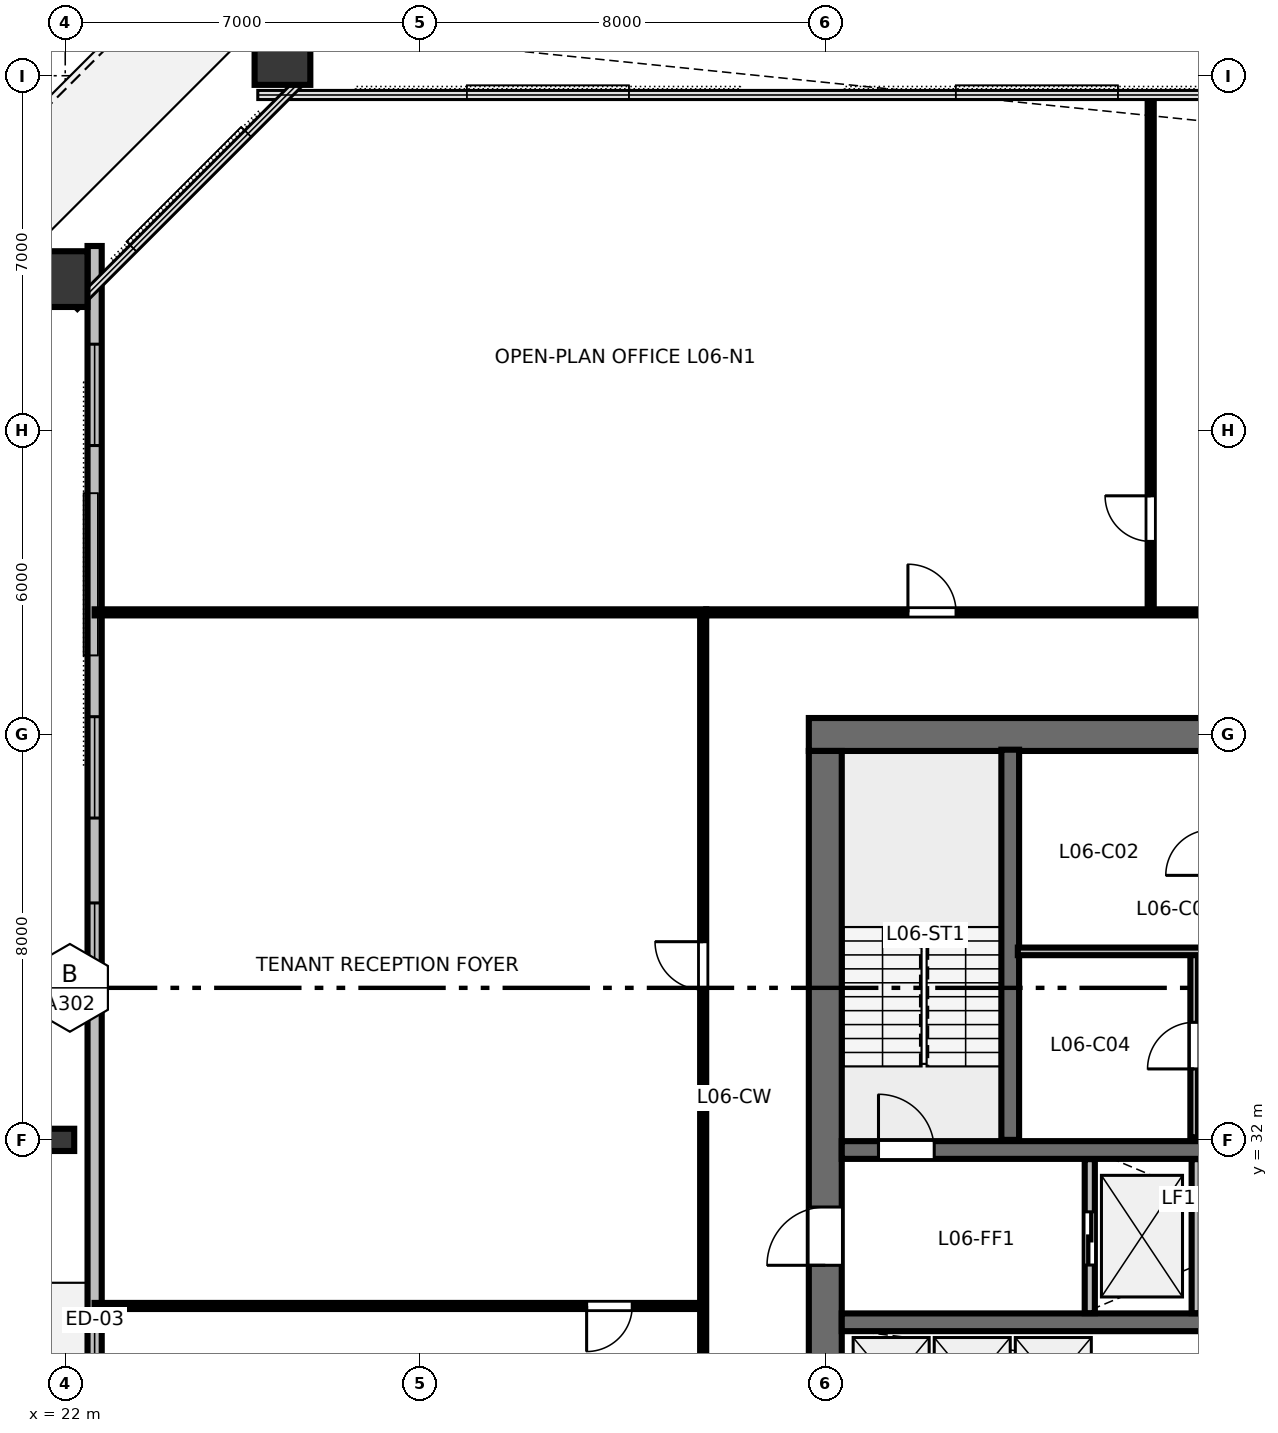
"""IFC4 building model, lengths in metres.
Left out: names, types, materials, properties, quantities, classifications, styles, units other than length and angle.
Written with IfcOpenShell. Run it as: python <this file> out.ifc"""

import sys

from ifc_helpers import new_model, si_unit, direction, frame, frame_2d, origin, origin_2d, place, context, subcontext, project, spatial, rectangle, hollow_rectangle, i_section, extrude, element, fill, save


model = new_model("IFC4")
c1 = context("Model", 3, precision=1e-05, world=origin(), true_north=direction((0.0, 1.0)))
c2 = subcontext(c1, "Body", "Model", "MODEL_VIEW")
j1 = project(units=[si_unit("LENGTHUNIT", "METRE"), si_unit("PLANEANGLEUNIT", "RADIAN")], contexts=[c1])
p1 = place(None, origin())
s1 = spatial("IfcSite", under=j1, at=p1, CompositionType="ELEMENT")
p2 = place(p1, origin())
s2 = spatial("IfcBuilding", under=s1, at=p2, CompositionType="ELEMENT")
p3 = place(p2, frame((0.0, 0.0, 28.0)))
s3 = spatial("IfcBuildingStorey", under=s2, at=p3, CompositionType="ELEMENT", Elevation=28.0)
p4 = place(p3, frame((36.675, 40.0, 0.0), z_axis=(0.0, 0.0, 1.0), x_axis=(1.0, 0.0, 0.0)))
e1 = element("IfcWall", 1, at=p4, inside=s3, PredefinedType="SHEAR", context=c2, shape_type="SweptSolid", body=[
    extrude(rectangle(XDim=18.65, YDim=0.65, at=frame_2d((9.325, 0.0))), origin(), (0.0, 0.0, 1.0), 3.36),
])
p5 = place(p4, frame((8.825, 0.0, 0.0)))
e2 = element("IfcOpeningElement", 2, at=p5, cuts=e1, PredefinedType="OPENING", context=c2, shape_type="SweptSolid", body=[
    extrude(rectangle(XDim=1.0, YDim=2.15, at=frame_2d((0.5, 1.075))), frame((0.0, 0.335, 0.0), z_axis=(0.0, -1.0, 0.0), x_axis=(1.0, 0.0, 0.0)), (0.0, 0.0, 1.0), 0.67),
])
p6 = place(p3, frame((37.0, 24.325, 0.0), z_axis=(0.0, 0.0, 1.0), x_axis=(0.0, 1.0, 0.0)))
e3 = element("IfcWall", 3, at=p6, inside=s3, PredefinedType="SHEAR", context=c2, shape_type="SweptSolid", body=[
    extrude(rectangle(XDim=15.35, YDim=0.65, at=frame_2d((7.675, 0.0))), origin(), (0.0, 0.0, 1.0), 3.36),
])
p7 = place(p6, frame((5.2, 0.0, 0.0)))
e4 = element("IfcOpeningElement", 4, at=p7, cuts=e3, PredefinedType="OPENING", context=c2, shape_type="SweptSolid", body=[
    extrude(rectangle(XDim=1.15, YDim=2.15, at=frame_2d((0.575, 1.075))), frame((0.0, 0.335, 0.0), z_axis=(0.0, -1.0, 0.0), x_axis=(1.0, 0.0, 0.0)), (0.0, 0.0, 1.0), 0.67),
])
p8 = place(p3, frame((37.325, 31.8, 0.0), z_axis=(0.0, 0.0, 1.0), x_axis=(1.0, 0.0, 0.0)))
e5 = element("IfcWall", 5, at=p8, inside=s3, PredefinedType="SHEAR", context=c2, shape_type="SweptSolid", body=[
    extrude(rectangle(XDim=17.35, YDim=0.35, at=frame_2d((8.675, 0.0))), origin(), (0.0, 0.0, 1.0), 3.36),
])
p9 = place(p8, frame((0.725, 0.0, 0.0)))
e6 = element("IfcOpeningElement", 6, at=p9, cuts=e5, PredefinedType="OPENING", context=c2, shape_type="SweptSolid", body=[
    extrude(rectangle(XDim=1.1, YDim=2.15, at=frame_2d((0.55, 1.075))), frame((0.0, 0.185, 0.0), z_axis=(0.0, -1.0, 0.0), x_axis=(1.0, 0.0, 0.0)), (0.0, 0.0, 1.0), 0.37),
])
p10 = place(p8, frame((14.625, 0.0, 0.0)))
e7 = element("IfcOpeningElement", 7, at=p10, cuts=e5, PredefinedType="OPENING", context=c2, shape_type="SweptSolid", body=[
    extrude(rectangle(XDim=1.1, YDim=2.15, at=frame_2d((0.55, 1.075))), frame((0.0, 0.185, 0.0), z_axis=(0.0, -1.0, 0.0), x_axis=(1.0, 0.0, 0.0)), (0.0, 0.0, 1.0), 0.37),
])
p11 = place(p3, frame((37.325, 28.4, 0.0), z_axis=(0.0, 0.0, 1.0), x_axis=(1.0, 0.0, 0.0)))
e8 = element("IfcWall", 8, at=p11, inside=s3, PredefinedType="SHEAR", context=c2, shape_type="SweptSolid", body=[
    extrude(rectangle(XDim=17.35, YDim=0.35, at=frame_2d((8.675, 0.0))), origin(), (0.0, 0.0, 1.0), 3.36),
])
for number, where, z_axis, x_axis in (
    (9, (26.287, 53.469, 0.0), (0.0, 0.0, 1.0), (1.0, 0.0, 0.0)),
    (10, (21.789, 48.987, 0.0), (0.0, 0.0, 1.0), (0.0, 1.0, 0.0)),
):
    element("IfcColumn", number, at=place(p3, frame(where, z_axis=z_axis, x_axis=x_axis)), inside=s3, PredefinedType="COLUMN", context=c2, shape_type="SweptSolid", body=[
        extrude(hollow_rectangle(XDim=1.1, YDim=1.3, WallThickness=0.07, at=origin_2d()), origin(), (0.0, 0.0, 1.0), 3.358),
    ])
p12 = place(p3, frame((21.92, 32.0, 0.0), z_axis=(0.0, 0.0, 1.0), x_axis=(0.0, 1.0, 0.0)))
e11 = element("IfcColumn", 11, at=p12, inside=s3, PredefinedType="COLUMN", context=c2, shape_type="SweptSolid", body=[
    extrude(i_section(OverallWidth=0.439, OverallDepth=0.514, WebThickness=0.06, FlangeThickness=0.097, FilletRadius=0.025, at=origin_2d()), origin(), (0.0, 0.0, 1.0), 3.358),
])
p13 = place(p3, frame((22.58, 49.64, 0.0), z_axis=(0.0, 0.0, 1.0), x_axis=(0.0, -1.0, 0.0)))
e12 = element("IfcWall", 12, at=p13, inside=s3, PredefinedType="STANDARD", context=c2, shape_type="SweptSolid", body=[
    extrude(rectangle(XDim=35.28, YDim=0.28, at=frame_2d((17.64, 0.0))), origin(), (0.0, 0.0, 1.0), 3.36),
])
p14 = place(p13, frame((22.04, 0.0, 0.0)))
e13 = element("IfcOpeningElement", 13, at=p14, cuts=e12, PredefinedType="OPENING", context=c2, shape_type="SweptSolid", body=[
    extrude(rectangle(XDim=1.6, YDim=2.15, at=frame_2d((0.8, 1.075))), frame((0.0, 0.15, 0.0), z_axis=(0.0, -1.0, 0.0), x_axis=(1.0, 0.0, 0.0)), (0.0, 0.0, 1.0), 0.3),
])
p15 = place(p13, frame((1.938, 0.0, 0.8)))
e14 = element("IfcOpeningElement", 14, at=p15, cuts=e12, PredefinedType="OPENING", context=c2, shape_type="SweptSolid", body=[
    extrude(rectangle(XDim=2.0, YDim=1.95, at=frame_2d((1.0, 0.975))), frame((0.0, 0.15, 0.0), z_axis=(0.0, -1.0, 0.0), x_axis=(1.0, 0.0, 0.0)), (0.0, 0.0, 1.0), 0.3),
])
p16 = place(p13, frame((9.289, 0.0, 0.8)))
e15 = element("IfcOpeningElement", 15, at=p16, cuts=e12, PredefinedType="OPENING", context=c2, shape_type="SweptSolid", body=[
    extrude(rectangle(XDim=2.0, YDim=1.95, at=frame_2d((1.0, 0.975))), frame((0.0, 0.15, 0.0), z_axis=(0.0, -1.0, 0.0), x_axis=(1.0, 0.0, 0.0)), (0.0, 0.0, 1.0), 0.3),
])
p17 = place(p13, frame((12.964, 0.0, 0.8)))
e16 = element("IfcOpeningElement", 16, at=p17, cuts=e12, PredefinedType="OPENING", context=c2, shape_type="SweptSolid", body=[
    extrude(rectangle(XDim=2.0, YDim=1.95, at=frame_2d((1.0, 0.975))), frame((0.0, 0.15, 0.0), z_axis=(0.0, -1.0, 0.0), x_axis=(1.0, 0.0, 0.0)), (0.0, 0.0, 1.0), 0.3),
])
p18 = place(p13, frame((31.342, 0.0, 0.8)))
e17 = element("IfcOpeningElement", 17, at=p18, cuts=e12, PredefinedType="OPENING", context=c2, shape_type="SweptSolid", body=[
    extrude(rectangle(XDim=2.0, YDim=1.95, at=frame_2d((1.0, 0.975))), frame((0.0, 0.15, 0.0), z_axis=(0.0, -1.0, 0.0), x_axis=(1.0, 0.0, 0.0)), (0.0, 0.0, 1.0), 0.3),
])
p19 = place(p3, frame((40.65, 32.0, 0.0), z_axis=(0.0, 0.0, 1.0), x_axis=(0.0, 1.0, 0.0)))
e18 = element("IfcWall", 18, at=p19, inside=s3, PredefinedType="SHEAR", context=c2, shape_type="SweptSolid", body=[
    extrude(rectangle(XDim=7.7, YDim=0.35, at=frame_2d((3.85, 0.0))), origin(), (0.0, 0.0, 1.0), 3.6),
])
p20 = place(p3, frame((44.28, 32.05, 0.0), z_axis=(0.0, 0.0, 1.0), x_axis=(0.0, 1.0, 0.0)))
e19 = element("IfcWall", 19, at=p20, inside=s3, PredefinedType="PARTITIONING", context=c2, shape_type="SweptSolid", body=[
    extrude(rectangle(XDim=3.67, YDim=0.15, at=frame_2d((1.835, 0.0))), origin(), (0.0, 0.0, 1.0), 3.36),
])
p21 = place(p20, frame((1.35, 0.0, 0.0)))
e20 = element("IfcOpeningElement", 20, at=p21, cuts=e19, PredefinedType="OPENING", context=c2, shape_type="SweptSolid", body=[
    extrude(rectangle(XDim=0.92, YDim=2.15, at=frame_2d((0.46, 1.075))), frame((0.0, 0.085, 0.0), z_axis=(0.0, -1.0, 0.0), x_axis=(1.0, 0.0, 0.0)), (0.0, 0.0, 1.0), 0.17),
])
p22 = place(p3, frame((40.8, 35.72, 0.0), z_axis=(0.0, 0.0, 1.0), x_axis=(1.0, 0.0, 0.0)))
e21 = element("IfcWall", 21, at=p22, inside=s3, PredefinedType="PARTITIONING", context=c2, shape_type="SweptSolid", body=[
    extrude(rectangle(XDim=10.4, YDim=0.15, at=frame_2d((5.2, 0.0))), origin(), (0.0, 0.0, 1.0), 3.36),
])
p23 = place(p22, frame((4.9, 0.0, 0.0)))
e22 = element("IfcOpeningElement", 22, at=p23, cuts=e21, PredefinedType="OPENING", context=c2, shape_type="SweptSolid", body=[
    extrude(rectangle(XDim=0.9, YDim=2.15, at=frame_2d((0.45, 1.075))), frame((0.0, 0.085, 0.0), z_axis=(0.0, -1.0, 0.0), x_axis=(1.0, 0.0, 0.0)), (0.0, 0.0, 1.0), 0.17),
])
p24 = place(p3, frame((42.22, 28.58, 0.0), z_axis=(0.0, 0.0, 1.0), x_axis=(0.0, 1.0, 0.0)))
e23 = element("IfcWall", 23, at=p24, inside=s3, PredefinedType="PARTITIONING", context=c2, shape_type="SweptSolid", body=[
    extrude(rectangle(XDim=3.04, YDim=0.2, at=frame_2d((1.52, 0.0))), origin(), (0.0, 0.0, 1.0), 3.36),
])
p25 = place(p24, frame((0.95, 0.0, 0.0)))
e24 = element("IfcOpeningElement", 24, at=p25, cuts=e23, PredefinedType="OPENING", context=c2, shape_type="SweptSolid", body=[
    extrude(rectangle(XDim=1.05, YDim=2.15, at=frame_2d((0.525, 1.075))), frame((0.0, 0.11, 0.0), z_axis=(0.0, -1.0, 0.0), x_axis=(1.0, 0.0, 0.0)), (0.0, 0.0, 1.0), 0.22),
])
p26 = place(p3, frame((44.32, 28.58, 0.0), z_axis=(0.0, 0.0, 1.0), x_axis=(0.0, 1.0, 0.0)))
e25 = element("IfcWall", 25, at=p26, inside=s3, PredefinedType="PARTITIONING", context=c2, shape_type="SweptSolid", body=[
    extrude(rectangle(XDim=3.04, YDim=0.18, at=frame_2d((1.52, 0.0))), origin(), (0.0, 0.0, 1.0), 3.36),
])
p27 = place(p3, frame((43.422, 42.41, 0.0), z_axis=(0.0, 0.0, 1.0), x_axis=(0.0, 1.0, 0.0)))
e26 = element("IfcWall", 26, at=p27, inside=s3, PredefinedType="PARTITIONING", context=c2, shape_type="SweptSolid", body=[
    extrude(rectangle(XDim=10.21, YDim=0.12, at=frame_2d((5.105, 0.0))), origin(), (0.0, 0.0, 1.0), 2.64),
])
p28 = place(p27, frame((1.4, 0.0, 0.0)))
e27 = element("IfcOpeningElement", 27, at=p28, cuts=e26, PredefinedType="OPENING", context=c2, shape_type="SweptSolid", body=[
    extrude(rectangle(XDim=0.9, YDim=2.15, at=frame_2d((0.45, 1.075))), frame((0.0, 0.07, 0.0), z_axis=(0.0, -1.0, 0.0), x_axis=(1.0, 0.0, 0.0)), (0.0, 0.0, 1.0), 0.14),
])
p29 = place(p3, frame((34.65, 42.41, 0.0), z_axis=(0.0, 0.0, 1.0), x_axis=(1.0, 0.0, 0.0)))
e28 = element("IfcWall", 28, at=p29, inside=s3, PredefinedType="PARTITIONING", context=c2, shape_type="SweptSolid", body=[
    extrude(rectangle(XDim=22.7, YDim=0.12, at=frame_2d((11.35, 0.0))), origin(), (0.0, 0.0, 1.0), 2.64),
])
p30 = place(p29, frame((3.981, 0.0, 0.0)))
e29 = element("IfcOpeningElement", 29, at=p30, cuts=e28, PredefinedType="OPENING", context=c2, shape_type="SweptSolid", body=[
    extrude(rectangle(XDim=0.95, YDim=2.15, at=frame_2d((0.475, 1.075))), frame((0.0, 0.07, 0.0), z_axis=(0.0, -1.0, 0.0), x_axis=(1.0, 0.0, 0.0)), (0.0, 0.0, 1.0), 0.14),
])
p31 = place(p29, frame((10.508, 0.0, 0.0)))
e30 = element("IfcOpeningElement", 30, at=p31, cuts=e28, PredefinedType="OPENING", context=c2, shape_type="SweptSolid", body=[
    extrude(rectangle(XDim=0.95, YDim=2.15, at=frame_2d((0.475, 1.075))), frame((0.0, 0.07, 0.0), z_axis=(0.0, -1.0, 0.0), x_axis=(1.0, 0.0, 0.0)), (0.0, 0.0, 1.0), 0.14),
])
p32 = place(p29, frame((17.402, 0.0, 0.0)))
e31 = element("IfcOpeningElement", 31, at=p32, cuts=e28, PredefinedType="OPENING", context=c2, shape_type="SweptSolid", body=[
    extrude(rectangle(XDim=0.95, YDim=2.15, at=frame_2d((0.475, 1.075))), frame((0.0, 0.07, 0.0), z_axis=(0.0, -1.0, 0.0), x_axis=(1.0, 0.0, 0.0)), (0.0, 0.0, 1.0), 0.14),
])
p33 = place(p3, frame((34.59, 28.722, 0.0), z_axis=(0.0, 0.0, 1.0), x_axis=(-1.0, 0.0, 0.0)))
e32 = element("IfcWall", 32, at=p33, inside=s3, PredefinedType="PARTITIONING", context=c2, shape_type="SweptSolid", body=[
    extrude(rectangle(XDim=12.01, YDim=0.12, at=frame_2d((6.005, 0.0))), origin(), (0.0, 0.0, 1.0), 2.64),
])
p34 = place(p33, frame((1.4, 0.0, 0.0)))
e33 = element("IfcOpeningElement", 33, at=p34, cuts=e32, PredefinedType="OPENING", context=c2, shape_type="SweptSolid", body=[
    extrude(rectangle(XDim=0.9, YDim=2.15, at=frame_2d((0.45, 1.075))), frame((0.0, 0.07, 0.0), z_axis=(0.0, -1.0, 0.0), x_axis=(1.0, 0.0, 0.0)), (0.0, 0.0, 1.0), 0.14),
])
p35 = place(p3, frame((34.59, 21.65, 0.0), z_axis=(0.0, 0.0, 1.0), x_axis=(0.0, 1.0, 0.0)))
e34 = element("IfcWall", 34, at=p35, inside=s3, PredefinedType="PARTITIONING", context=c2, shape_type="SweptSolid", body=[
    extrude(rectangle(XDim=20.7, YDim=0.12, at=frame_2d((10.35, 0.0))), origin(), (0.0, 0.0, 1.0), 2.64),
])
p36 = place(p35, frame((3.161, 0.0, 0.0)))
e35 = element("IfcOpeningElement", 35, at=p36, cuts=e34, PredefinedType="OPENING", context=c2, shape_type="SweptSolid", body=[
    extrude(rectangle(XDim=0.95, YDim=2.15, at=frame_2d((0.475, 1.075))), frame((0.0, 0.07, 0.0), z_axis=(0.0, -1.0, 0.0), x_axis=(1.0, 0.0, 0.0)), (0.0, 0.0, 1.0), 0.14),
])
p37 = place(p35, frame((13.311, 0.0, 0.0)))
e36 = element("IfcOpeningElement", 36, at=p37, cuts=e34, PredefinedType="OPENING", context=c2, shape_type="SweptSolid", body=[
    extrude(rectangle(XDim=0.95, YDim=2.15, at=frame_2d((0.475, 1.075))), frame((0.0, 0.07, 0.0), z_axis=(0.0, -1.0, 0.0), x_axis=(1.0, 0.0, 0.0)), (0.0, 0.0, 1.0), 0.14),
])
p38 = place(p3, frame((34.65, 42.41, 0.0), z_axis=(0.0, 0.0, 1.0), x_axis=(-1.0, 0.0, 0.0)))
e37 = element("IfcWall", 37, at=p38, inside=s3, PredefinedType="PARTITIONING", context=c2, shape_type="SweptSolid", body=[
    extrude(rectangle(XDim=12.07, YDim=0.12, at=frame_2d((6.035, 0.0))), origin(), (0.0, 0.0, 1.0), 2.64),
])
p39 = place(p15, origin())
e38 = element("IfcWindow", 38, at=p39, inside=s3, PartitioningType="SINGLE_PANEL", PredefinedType="WINDOW", context=c2, shape_type="SweptSolid", body=[
    extrude(rectangle(XDim=2.0, YDim=1.95, at=frame_2d((1.0, 0.975))), frame((0.0, 0.03, 0.0), z_axis=(0.0, -1.0, 0.0), x_axis=(1.0, 0.0, 0.0)), (0.0, 0.0, 1.0), 0.06),
])
fill(e14, e38)
p40 = place(p16, origin())
e39 = element("IfcWindow", 39, at=p40, inside=s3, PartitioningType="SINGLE_PANEL", PredefinedType="WINDOW", context=c2, shape_type="SweptSolid", body=[
    extrude(rectangle(XDim=2.0, YDim=1.95, at=frame_2d((1.0, 0.975))), frame((0.0, 0.03, 0.0), z_axis=(0.0, -1.0, 0.0), x_axis=(1.0, 0.0, 0.0)), (0.0, 0.0, 1.0), 0.06),
])
fill(e15, e39)
p41 = place(p17, origin())
e40 = element("IfcWindow", 40, at=p41, inside=s3, PartitioningType="SINGLE_PANEL", PredefinedType="WINDOW", context=c2, shape_type="SweptSolid", body=[
    extrude(rectangle(XDim=2.0, YDim=1.95, at=frame_2d((1.0, 0.975))), frame((0.0, 0.03, 0.0), z_axis=(0.0, -1.0, 0.0), x_axis=(1.0, 0.0, 0.0)), (0.0, 0.0, 1.0), 0.06),
])
fill(e16, e40)
p42 = place(p9, origin())
e41 = element("IfcDoor", 41, at=p42, inside=s3, OperationType="SINGLE_SWING_LEFT", PredefinedType="DOOR", context=c2, shape_type="SweptSolid", body=[
    extrude(rectangle(XDim=1.1, YDim=2.15, at=frame_2d((0.55, 1.075))), frame((0.0, 0.025, 0.0), z_axis=(0.0, -1.0, 0.0), x_axis=(1.0, 0.0, 0.0)), (0.0, 0.0, 1.0), 0.05),
])
fill(e6, e41)
p43 = place(p7, origin())
e42 = element("IfcDoor", 42, at=p43, inside=s3, OperationType="SINGLE_SWING_LEFT", PredefinedType="DOOR", context=c2, shape_type="SweptSolid", body=[
    extrude(rectangle(XDim=1.15, YDim=2.15, at=frame_2d((0.575, 1.075))), frame((0.0, 0.025, 0.0), z_axis=(0.0, -1.0, 0.0), x_axis=(1.0, 0.0, 0.0)), (0.0, 0.0, 1.0), 0.05),
])
fill(e4, e42)
p44 = place(p21, origin())
e43 = element("IfcDoor", 43, at=p44, inside=s3, OperationType="SINGLE_SWING_LEFT", PredefinedType="DOOR", context=c2, shape_type="SweptSolid", body=[
    extrude(rectangle(XDim=0.92, YDim=2.15, at=frame_2d((0.46, 1.075))), frame((0.0, 0.025, 0.0), z_axis=(0.0, -1.0, 0.0), x_axis=(1.0, 0.0, 0.0)), (0.0, 0.0, 1.0), 0.05),
])
fill(e20, e43)
p45 = place(p25, origin())
e44 = element("IfcDoor", 44, at=p45, inside=s3, OperationType="SLIDING_TO_LEFT", PredefinedType="DOOR", context=c2, shape_type="SweptSolid", body=[
    extrude(rectangle(XDim=1.05, YDim=2.15, at=frame_2d((0.525, 1.075))), frame((0.0, 0.025, 0.0), z_axis=(0.0, -1.0, 0.0), x_axis=(1.0, 0.0, 0.0)), (0.0, 0.0, 1.0), 0.05),
])
fill(e24, e44)
p46 = place(p28, origin())
e45 = element("IfcDoor", 45, at=p46, inside=s3, OperationType="SINGLE_SWING_RIGHT", PredefinedType="DOOR", context=c2, shape_type="SweptSolid", body=[
    extrude(rectangle(XDim=0.9, YDim=2.15, at=frame_2d((0.45, 1.075))), frame((0.0, 0.025, 0.0), z_axis=(0.0, -1.0, 0.0), x_axis=(1.0, 0.0, 0.0)), (0.0, 0.0, 1.0), 0.05),
])
fill(e27, e45)
p47 = place(p30, origin())
e46 = element("IfcDoor", 46, at=p47, inside=s3, OperationType="SINGLE_SWING_LEFT", PredefinedType="DOOR", context=c2, shape_type="SweptSolid", body=[
    extrude(rectangle(XDim=0.95, YDim=2.15, at=frame_2d((0.475, 1.075))), frame((0.0, 0.025, 0.0), z_axis=(0.0, -1.0, 0.0), x_axis=(1.0, 0.0, 0.0)), (0.0, 0.0, 1.0), 0.05),
])
fill(e29, e46)
p48 = place(p34, origin())
e47 = element("IfcDoor", 47, at=p48, inside=s3, OperationType="SINGLE_SWING_RIGHT", PredefinedType="DOOR", context=c2, shape_type="SweptSolid", body=[
    extrude(rectangle(XDim=0.9, YDim=2.15, at=frame_2d((0.45, 1.075))), frame((0.0, 0.025, 0.0), z_axis=(0.0, -1.0, 0.0), x_axis=(1.0, 0.0, 0.0)), (0.0, 0.0, 1.0), 0.05),
])
fill(e33, e47)
p49 = place(p37, origin())
e48 = element("IfcDoor", 48, at=p49, inside=s3, OperationType="SINGLE_SWING_RIGHT", PredefinedType="DOOR", context=c2, shape_type="SweptSolid", body=[
    extrude(rectangle(XDim=0.95, YDim=2.15, at=frame_2d((0.475, 1.075))), frame((0.0, 0.025, 0.0), z_axis=(0.0, -1.0, 0.0), x_axis=(1.0, 0.0, 0.0)), (0.0, 0.0, 1.0), 0.05),
])
fill(e36, e48)
save(model, sys.argv[1])
